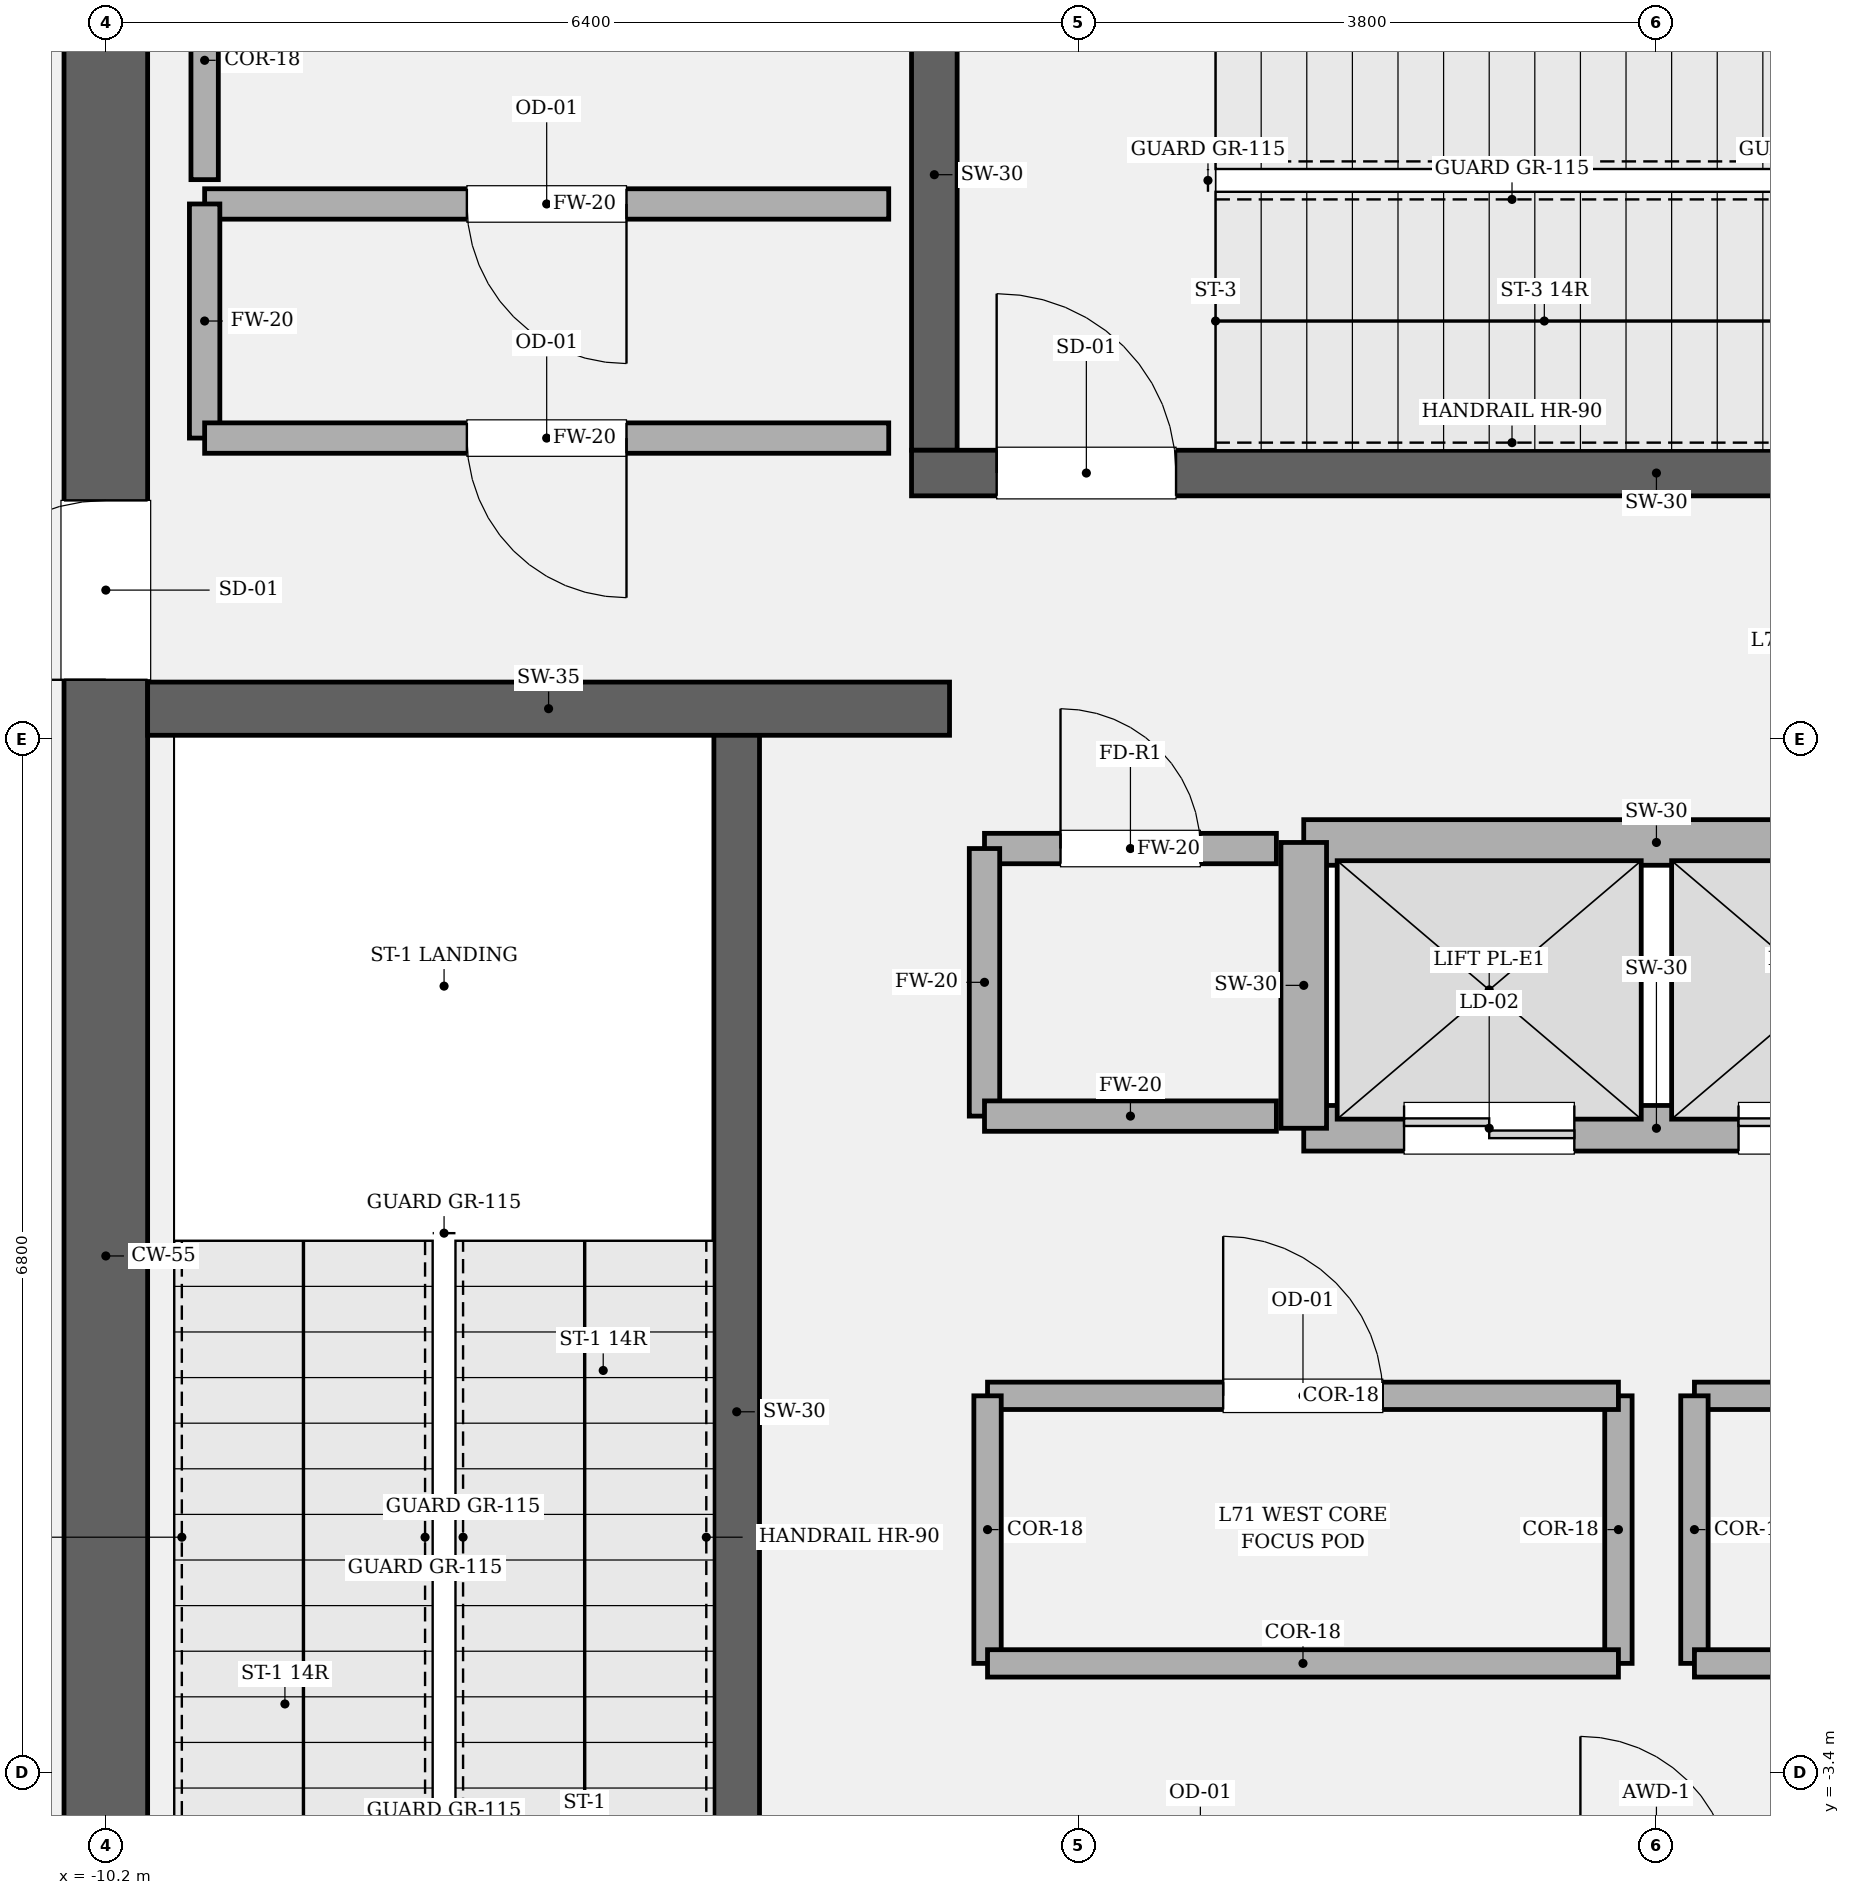
"""IFC4 building model, lengths in metres.
Left out: names, types, materials, properties, quantities, classifications, styles, units other than length and angle.
Written with IfcOpenShell. Run it as: python <this file> out.ifc"""

import sys

from ifc_helpers import new_model, si_unit, direction, frame, frame_2d, origin, place, context, subcontext, project, spatial, rectangle, extrude, element, fill, save


model = new_model("IFC4")
c1 = context("Model", 3, precision=1e-05, world=origin(), true_north=direction((0.0, 1.0)))
c2 = subcontext(c1, "Body", "Model", "MODEL_VIEW")
j1 = project(units=[si_unit("LENGTHUNIT", "METRE"), si_unit("PLANEANGLEUNIT", "RADIAN")], contexts=[c1])
p1 = place(None, origin())
s1 = spatial("IfcSite", under=j1, at=p1, CompositionType="ELEMENT")
p2 = place(p1, origin())
s2 = spatial("IfcBuilding", under=s1, at=p2, CompositionType="ELEMENT")
p3 = place(p2, frame((0.0, 0.0, 300.6)))
s3 = spatial("IfcBuildingStorey", under=s2, at=p3, CompositionType="ELEMENT", Elevation=300.6)
p4 = place(p3, frame((-10.2, -8.925, 0.0), z_axis=(0.0, 0.0, 1.0), x_axis=(0.0, 1.0, 0.0)))
e1 = element("IfcWall", 1, at=p4, inside=s3, PredefinedType="SHEAR", context=c2, shape_type="SweptSolid", body=[
    extrude(rectangle(XDim=17.85, YDim=0.55, at=frame_2d((8.925, 0.0))), origin(), (0.0, 0.0, 1.0), 4.2),
])
p5 = place(p4, frame((12.715, 0.0, 0.0)))
e2 = element("IfcOpeningElement", 2, at=p5, cuts=e1, PredefinedType="OPENING", context=c2, shape_type="SweptSolid", body=[
    extrude(rectangle(XDim=1.18, YDim=2.2, at=frame_2d((0.59, 1.1))), frame((0.0, 0.285, 0.0), z_axis=(0.0, -1.0, 0.0), x_axis=(1.0, 0.0, 0.0)), (0.0, 0.0, 1.0), 0.57),
])
p6 = place(p3, frame((-6.05, -5.5, 0.0), z_axis=(0.0, 0.0, 1.0), x_axis=(0.0, 1.0, 0.0)))
e3 = element("IfcWall", 3, at=p6, inside=s3, PredefinedType="SOLIDWALL", context=c2, shape_type="SweptSolid", body=[
    extrude(rectangle(XDim=8.95, YDim=0.3, at=frame_2d((4.475, 0.0))), origin(), (0.0, 0.0, 1.0), 4.2),
])
p7 = place(p3, frame((-4.75, 5.3, 0.0), z_axis=(0.0, 0.0, 1.0), x_axis=(0.0, 1.0, 0.0)))
e4 = element("IfcWall", 4, at=p7, inside=s3, PredefinedType="SOLIDWALL", context=c2, shape_type="SweptSolid", body=[
    extrude(rectangle(XDim=3.625, YDim=0.3, at=frame_2d((1.812, 0.0))), origin(), (0.0, 0.0, 1.0), 4.2),
])
p8 = place(p3, frame((-4.9, 5.15, 0.0), z_axis=(0.0, 0.0, 1.0), x_axis=(1.0, 0.0, 0.0)))
e5 = element("IfcWall", 5, at=p8, inside=s3, PredefinedType="SOLIDWALL", context=c2, shape_type="SweptSolid", body=[
    extrude(rectangle(XDim=9.8, YDim=0.3, at=frame_2d((4.9, 0.0))), origin(), (0.0, 0.0, 1.0), 4.2),
])
p9 = place(p8, frame((0.56, 0.0, 0.0)))
e6 = element("IfcOpeningElement", 6, at=p9, cuts=e5, PredefinedType="OPENING", context=c2, shape_type="SweptSolid", body=[
    extrude(rectangle(XDim=1.18, YDim=2.2, at=frame_2d((0.59, 1.1))), frame((0.0, 0.16, 0.0), z_axis=(0.0, -1.0, 0.0), x_axis=(1.0, 0.0, 0.0)), (0.0, 0.0, 1.0), 0.32),
])
p10 = place(p3, frame((-9.925, 3.6, 0.0), z_axis=(0.0, 0.0, 1.0), x_axis=(1.0, 0.0, 0.0)))
e7 = element("IfcWall", 7, at=p10, inside=s3, PredefinedType="SOLIDWALL", context=c2, shape_type="SweptSolid", body=[
    extrude(rectangle(XDim=5.275, YDim=0.35, at=frame_2d((2.638, 0.0))), origin(), (0.0, 0.0, 1.0), 4.2),
])
p11 = place(p3, frame((-2.32, 0.84, 0.0), z_axis=(0.0, 0.0, 1.0), x_axis=(1.0, 0.0, 0.0)))
e8 = element("IfcWall", 8, at=p11, inside=s3, PredefinedType="SOLIDWALL", context=c2, shape_type="SweptSolid", body=[
    extrude(rectangle(XDim=4.64, YDim=0.3, at=frame_2d((2.32, 0.0))), origin(), (0.0, 0.0, 1.0), 4.0),
])
p12 = place(p11, frame((0.66, 0.0, 0.0)))
e9 = element("IfcOpeningElement", 9, at=p12, cuts=e8, PredefinedType="OPENING", context=c2, shape_type="SweptSolid", body=[
    extrude(rectangle(XDim=1.12, YDim=2.25, at=frame_2d((0.56, 1.125))), frame((0.0, 0.16, 0.0), z_axis=(0.0, -1.0, 0.0), x_axis=(1.0, 0.0, 0.0)), (0.0, 0.0, 1.0), 0.32),
])
p13 = place(p11, frame((2.86, 0.0, 0.0)))
e10 = element("IfcOpeningElement", 10, at=p13, cuts=e8, PredefinedType="OPENING", context=c2, shape_type="SweptSolid", body=[
    extrude(rectangle(XDim=1.12, YDim=2.25, at=frame_2d((0.56, 1.125))), frame((0.0, 0.16, 0.0), z_axis=(0.0, -1.0, 0.0), x_axis=(1.0, 0.0, 0.0)), (0.0, 0.0, 1.0), 0.32),
])
p14 = place(p3, frame((-2.32, 2.72, 0.0), z_axis=(0.0, 0.0, 1.0), x_axis=(1.0, 0.0, 0.0)))
e11 = element("IfcWall", 11, at=p14, inside=s3, PredefinedType="SOLIDWALL", context=c2, shape_type="SweptSolid", body=[
    extrude(rectangle(XDim=4.64, YDim=0.3, at=frame_2d((2.32, 0.0))), origin(), (0.0, 0.0, 1.0), 4.0),
])
p15 = place(p3, frame((-2.32, 0.84, 0.0), z_axis=(0.0, 0.0, 1.0), x_axis=(0.0, 1.0, 0.0)))
e12 = element("IfcWall", 12, at=p15, inside=s3, PredefinedType="SOLIDWALL", context=c2, shape_type="SweptSolid", body=[
    extrude(rectangle(XDim=1.88, YDim=0.3, at=frame_2d((0.94, 0.0))), origin(), (0.0, 0.0, 1.0), 4.0),
])
p16 = place(p3, frame((-0.25, -2.68, 0.0), z_axis=(0.0, 0.0, 1.0), x_axis=(0.0, 1.0, 0.0)))
e13 = element("IfcWall", 13, at=p16, inside=s3, PredefinedType="PARTITIONING", context=c2, shape_type="SweptSolid", body=[
    extrude(rectangle(XDim=1.76, YDim=0.18, at=frame_2d((0.88, 0.0))), origin(), (0.0, 0.0, 1.0), 4.0),
])
p17 = place(p3, frame((-0.25, -0.92, 0.0), z_axis=(0.0, 0.0, 1.0), x_axis=(-1.0, 0.0, 0.0)))
e14 = element("IfcWall", 14, at=p17, inside=s3, PredefinedType="PARTITIONING", context=c2, shape_type="SweptSolid", body=[
    extrude(rectangle(XDim=4.15, YDim=0.18, at=frame_2d((2.075, 0.0))), origin(), (0.0, 0.0, 1.0), 4.0),
])
p18 = place(p17, frame((1.55, 0.0, 0.0)))
e15 = element("IfcOpeningElement", 15, at=p18, cuts=e14, PredefinedType="OPENING", context=c2, shape_type="SweptSolid", body=[
    extrude(rectangle(XDim=1.05, YDim=2.2, at=frame_2d((0.525, 1.1))), frame((0.0, 0.1, 0.0), z_axis=(0.0, -1.0, 0.0), x_axis=(1.0, 0.0, 0.0)), (0.0, 0.0, 1.0), 0.2),
])
p19 = place(p3, frame((-4.4, -0.92, 0.0), z_axis=(0.0, 0.0, 1.0), x_axis=(0.0, -1.0, 0.0)))
e16 = element("IfcWall", 16, at=p19, inside=s3, PredefinedType="PARTITIONING", context=c2, shape_type="SweptSolid", body=[
    extrude(rectangle(XDim=1.76, YDim=0.18, at=frame_2d((0.88, 0.0))), origin(), (0.0, 0.0, 1.0), 4.0),
])
for number, where, z_axis, x_axis in (
    (17, (-4.4, -2.68, 0.0), (0.0, 0.0, 1.0), (1.0, 0.0, 0.0)),
    (18, (4.4, -0.92, 0.0), (0.0, 0.0, 1.0), (-1.0, 0.0, 0.0)),
):
    element("IfcWall", number, at=place(p3, frame(where, z_axis=z_axis, x_axis=x_axis)), inside=s3, PredefinedType="PARTITIONING", context=c2, shape_type="SweptSolid", body=[
        extrude(rectangle(XDim=4.15, YDim=0.18, at=frame_2d((2.075, 0.0))), origin(), (0.0, 0.0, 1.0), 4.0),
    ])
p20 = place(p3, frame((0.25, -0.92, 0.0), z_axis=(0.0, 0.0, 1.0), x_axis=(0.0, -1.0, 0.0)))
e19 = element("IfcWall", 19, at=p20, inside=s3, PredefinedType="PARTITIONING", context=c2, shape_type="SweptSolid", body=[
    extrude(rectangle(XDim=1.76, YDim=0.18, at=frame_2d((0.88, 0.0))), origin(), (0.0, 0.0, 1.0), 4.0),
])
p21 = place(p3, frame((0.25, -2.68, 0.0), z_axis=(0.0, 0.0, 1.0), x_axis=(1.0, 0.0, 0.0)))
e20 = element("IfcWall", 20, at=p21, inside=s3, PredefinedType="PARTITIONING", context=c2, shape_type="SweptSolid", body=[
    extrude(rectangle(XDim=4.15, YDim=0.18, at=frame_2d((2.075, 0.0))), origin(), (0.0, 0.0, 1.0), 4.0),
])
p22 = place(p3, frame((-2.5, 2.68, 0.0), z_axis=(0.0, 0.0, 1.0), x_axis=(-1.0, 0.0, 0.0)))
e21 = element("IfcWall", 21, at=p22, inside=s3, PredefinedType="SOLIDWALL", context=c2, shape_type="SweptSolid", body=[
    extrude(rectangle(XDim=1.92, YDim=0.2, at=frame_2d((0.96, 0.0))), origin(), (0.0, 0.0, 1.0), 4.0),
])
p23 = place(p22, frame((0.5, 0.0, 0.0)))
e22 = element("IfcOpeningElement", 22, at=p23, cuts=e21, PredefinedType="OPENING", context=c2, shape_type="SweptSolid", body=[
    extrude(rectangle(XDim=0.92, YDim=2.1, at=frame_2d((0.46, 1.05))), frame((0.0, 0.11, 0.0), z_axis=(0.0, -1.0, 0.0), x_axis=(1.0, 0.0, 0.0)), (0.0, 0.0, 1.0), 0.22),
])
p24 = place(p3, frame((-4.42, 2.68, 0.0), z_axis=(0.0, 0.0, 1.0), x_axis=(0.0, -1.0, 0.0)))
e23 = element("IfcWall", 23, at=p24, inside=s3, PredefinedType="SOLIDWALL", context=c2, shape_type="SweptSolid", body=[
    extrude(rectangle(XDim=1.76, YDim=0.2, at=frame_2d((0.88, 0.0))), origin(), (0.0, 0.0, 1.0), 4.0),
])
p25 = place(p3, frame((-4.42, 0.92, 0.0), z_axis=(0.0, 0.0, 1.0), x_axis=(1.0, 0.0, 0.0)))
e24 = element("IfcWall", 24, at=p25, inside=s3, PredefinedType="SOLIDWALL", context=c2, shape_type="SweptSolid", body=[
    extrude(rectangle(XDim=1.92, YDim=0.2, at=frame_2d((0.96, 0.0))), origin(), (0.0, 0.0, 1.0), 4.0),
])
p26 = place(p3, frame((-5.05, 6.92, 0.0), z_axis=(0.0, 0.0, 1.0), x_axis=(-1.0, 0.0, 0.0)))
e25 = element("IfcWall", 25, at=p26, inside=s3, PredefinedType="SOLIDWALL", context=c2, shape_type="SweptSolid", body=[
    extrude(rectangle(XDim=4.5, YDim=0.2, at=frame_2d((2.25, 0.0))), origin(), (0.0, 0.0, 1.0), 4.0),
])
p27 = place(p26, frame((1.725, 0.0, 0.0)))
e26 = element("IfcOpeningElement", 26, at=p27, cuts=e25, PredefinedType="OPENING", context=c2, shape_type="SweptSolid", body=[
    extrude(rectangle(XDim=1.05, YDim=2.2, at=frame_2d((0.525, 1.1))), frame((0.0, 0.11, 0.0), z_axis=(0.0, -1.0, 0.0), x_axis=(1.0, 0.0, 0.0)), (0.0, 0.0, 1.0), 0.22),
])
p28 = place(p3, frame((-9.55, 6.92, 0.0), z_axis=(0.0, 0.0, 1.0), x_axis=(0.0, -1.0, 0.0)))
e27 = element("IfcWall", 27, at=p28, inside=s3, PredefinedType="SOLIDWALL", context=c2, shape_type="SweptSolid", body=[
    extrude(rectangle(XDim=1.54, YDim=0.2, at=frame_2d((0.77, 0.0))), origin(), (0.0, 0.0, 1.0), 4.0),
])
p29 = place(p3, frame((-9.55, 5.38, 0.0), z_axis=(0.0, 0.0, 1.0), x_axis=(1.0, 0.0, 0.0)))
e28 = element("IfcWall", 28, at=p29, inside=s3, PredefinedType="SOLIDWALL", context=c2, shape_type="SweptSolid", body=[
    extrude(rectangle(XDim=4.5, YDim=0.2, at=frame_2d((2.25, 0.0))), origin(), (0.0, 0.0, 1.0), 4.0),
])
p30 = place(p29, frame((1.725, 0.0, 0.0)))
e29 = element("IfcOpeningElement", 29, at=p30, cuts=e28, PredefinedType="OPENING", context=c2, shape_type="SweptSolid", body=[
    extrude(rectangle(XDim=1.05, YDim=2.2, at=frame_2d((0.525, 1.1))), frame((0.0, 0.11, 0.0), z_axis=(0.0, -1.0, 0.0), x_axis=(1.0, 0.0, 0.0)), (0.0, 0.0, 1.0), 0.22),
])
p31 = place(p3, frame((-9.55, 8.65, 0.0), z_axis=(0.0, 0.0, 1.0), x_axis=(0.0, -1.0, 0.0)))
e30 = element("IfcWall", 30, at=p31, inside=s3, PredefinedType="PARTITIONING", context=c2, shape_type="SweptSolid", body=[
    extrude(rectangle(XDim=1.57, YDim=0.18, at=frame_2d((0.785, 0.0))), origin(), (0.0, 0.0, 1.0), 4.0),
])
p32 = place(p9, origin())
e31 = element("IfcDoor", 31, at=p32, inside=s3, OperationType="SINGLE_SWING_LEFT", PredefinedType="DOOR", context=c2, shape_type="SweptSolid", body=[
    extrude(rectangle(XDim=1.18, YDim=2.2, at=frame_2d((0.59, 1.1))), frame((0.0, 0.025, 0.0), z_axis=(0.0, -1.0, 0.0), x_axis=(1.0, 0.0, 0.0)), (0.0, 0.0, 1.0), 0.05),
])
fill(e6, e31)
p33 = place(p5, origin())
e32 = element("IfcDoor", 32, at=p33, inside=s3, OperationType="SINGLE_SWING_LEFT", PredefinedType="DOOR", context=c2, shape_type="SweptSolid", body=[
    extrude(rectangle(XDim=1.18, YDim=2.2, at=frame_2d((0.59, 1.1))), frame((0.0, 0.025, 0.0), z_axis=(0.0, -1.0, 0.0), x_axis=(1.0, 0.0, 0.0)), (0.0, 0.0, 1.0), 0.05),
])
fill(e2, e32)
p34 = place(p12, origin())
e33 = element("IfcDoor", 33, at=p34, inside=s3, OperationType="DOUBLE_DOOR_SLIDING", PredefinedType="DOOR", context=c2, shape_type="SweptSolid", body=[
    extrude(rectangle(XDim=1.12, YDim=2.25, at=frame_2d((0.56, 1.125))), frame((0.0, 0.025, 0.0), z_axis=(0.0, -1.0, 0.0), x_axis=(1.0, 0.0, 0.0)), (0.0, 0.0, 1.0), 0.05),
])
fill(e9, e33)
p35 = place(p13, origin())
e34 = element("IfcDoor", 34, at=p35, inside=s3, OperationType="DOUBLE_DOOR_SLIDING", PredefinedType="DOOR", context=c2, shape_type="SweptSolid", body=[
    extrude(rectangle(XDim=1.12, YDim=2.25, at=frame_2d((0.56, 1.125))), frame((0.0, 0.025, 0.0), z_axis=(0.0, -1.0, 0.0), x_axis=(1.0, 0.0, 0.0)), (0.0, 0.0, 1.0), 0.05),
])
fill(e10, e34)
p36 = place(p18, origin())
e35 = element("IfcDoor", 35, at=p36, inside=s3, OperationType="SINGLE_SWING_RIGHT", PredefinedType="DOOR", context=c2, shape_type="SweptSolid", body=[
    extrude(rectangle(XDim=1.05, YDim=2.2, at=frame_2d((0.525, 1.1))), frame((0.0, 0.025, 0.0), z_axis=(0.0, -1.0, 0.0), x_axis=(1.0, 0.0, 0.0)), (0.0, 0.0, 1.0), 0.05),
])
fill(e15, e35)
p37 = place(p23, origin())
e36 = element("IfcDoor", 36, at=p37, inside=s3, OperationType="SINGLE_SWING_RIGHT", PredefinedType="DOOR", context=c2, shape_type="SweptSolid", body=[
    extrude(rectangle(XDim=0.92, YDim=2.1, at=frame_2d((0.46, 1.05))), frame((0.0, 0.025, 0.0), z_axis=(0.0, -1.0, 0.0), x_axis=(1.0, 0.0, 0.0)), (0.0, 0.0, 1.0), 0.05),
])
fill(e22, e36)
p38 = place(p30, origin())
e37 = element("IfcDoor", 37, at=p38, inside=s3, OperationType="SINGLE_SWING_RIGHT", PredefinedType="DOOR", context=c2, shape_type="SweptSolid", body=[
    extrude(rectangle(XDim=1.05, YDim=2.2, at=frame_2d((0.525, 1.1))), frame((0.0, 0.025, 0.0), z_axis=(0.0, -1.0, 0.0), x_axis=(1.0, 0.0, 0.0)), (0.0, 0.0, 1.0), 0.05),
])
fill(e29, e37)
p39 = place(p27, origin())
e38 = element("IfcDoor", 38, at=p39, inside=s3, OperationType="SINGLE_SWING_LEFT", PredefinedType="DOOR", context=c2, shape_type="SweptSolid", body=[
    extrude(rectangle(XDim=1.05, YDim=2.2, at=frame_2d((0.525, 1.1))), frame((0.0, 0.025, 0.0), z_axis=(0.0, -1.0, 0.0), x_axis=(1.0, 0.0, 0.0)), (0.0, 0.0, 1.0), 0.05),
])
fill(e26, e38)
save(model, sys.argv[1])
